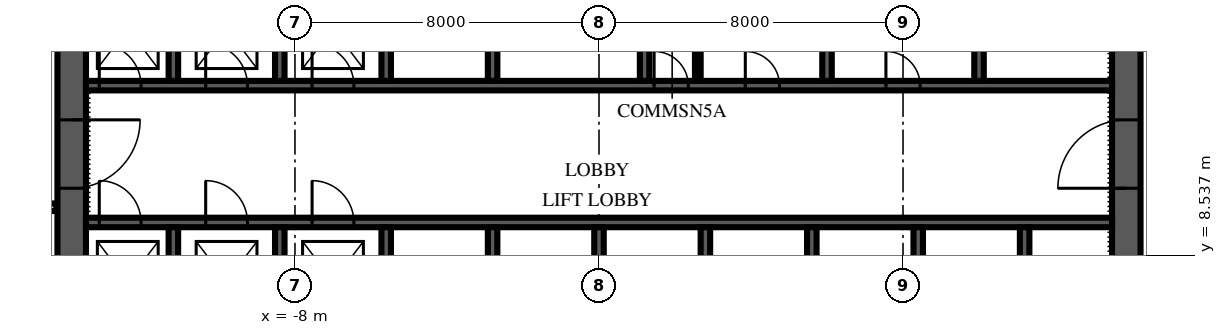
"""IFC4 building model, lengths in metres.
Left out: names, types, materials, properties, quantities, classifications, styles, units other than length and angle.
Written with IfcOpenShell. Run it as: python <this file> out.ifc"""

import sys

from ifc_helpers import new_model, si_unit, direction, frame, frame_2d, origin, place, context, subcontext, project, spatial, polyline, rectangle, outline, extrude, element, fill, save


model = new_model("IFC4")
c1 = context("Model", 3, precision=1e-05, world=origin(), true_north=direction((0.0, 1.0)))
c2 = subcontext(c1, "Body", "Model", "MODEL_VIEW")
j1 = project(units=[si_unit("LENGTHUNIT", "METRE"), si_unit("PLANEANGLEUNIT", "RADIAN")], contexts=[c1])
p1 = place(None, origin())
s1 = spatial("IfcSite", under=j1, at=p1, CompositionType="ELEMENT")
p2 = place(p1, origin())
s2 = spatial("IfcBuilding", under=s1, at=p2, CompositionType="ELEMENT")
p3 = place(p2, frame((0.0, 0.0, 127.0)))
s3 = spatial("IfcBuildingStorey", under=s2, at=p3, CompositionType="ELEMENT", Elevation=127.0)
p4 = place(p3, frame((13.875, 6.125, 0.0), z_axis=(0.0, 0.0, 1.0), x_axis=(0.0, 1.0, 0.0)))
e1 = element("IfcWall", 1, at=p4, inside=s3, PredefinedType="SHEAR", context=c2, shape_type="SweptSolid", body=[
    extrude(outline(polyline([(0.0, -0.375), (17.75, -0.375), (17.75, 0.0), (17.375, 0.0), (17.375, 0.375), (0.375, 0.375), (0.375, 0.0), (0.0, 0.0), (0.0, -0.375)])), origin(), (0.0, 0.0, 1.0), 4.0),
])
p5 = place(p4, frame((4.175, 0.0, 0.0)))
e2 = element("IfcOpeningElement", 2, at=p5, cuts=e1, PredefinedType="OPENING", context=c2, shape_type="SweptSolid", body=[
    extrude(rectangle(XDim=1.8, YDim=2.4, at=frame_2d((0.9, 1.2))), frame((0.0, 0.39, 0.0), z_axis=(0.0, -1.0, 0.0), x_axis=(1.0, 0.0, 0.0)), (0.0, 0.0, 1.0), 0.78),
])
p6 = place(p3, frame((-13.875, 23.875, 0.0), z_axis=(0.0, 0.0, 1.0), x_axis=(0.0, -1.0, 0.0)))
e3 = element("IfcWall", 3, at=p6, inside=s3, PredefinedType="SHEAR", context=c2, shape_type="SweptSolid", body=[
    extrude(outline(polyline([(0.0, -0.375), (17.75, -0.375), (17.75, 0.0), (17.375, 0.0), (17.375, 0.375), (0.375, 0.375), (0.375, 0.0), (0.0, 0.0), (0.0, -0.375)])), origin(), (0.0, 0.0, 1.0), 4.0),
])
p7 = place(p6, frame((11.775, 0.0, 0.0)))
e4 = element("IfcOpeningElement", 4, at=p7, cuts=e3, PredefinedType="OPENING", context=c2, shape_type="SweptSolid", body=[
    extrude(rectangle(XDim=1.8, YDim=2.4, at=frame_2d((0.9, 1.2))), frame((0.0, 0.39, 0.0), z_axis=(0.0, -1.0, 0.0), x_axis=(1.0, 0.0, 0.0)), (0.0, 0.0, 1.0), 0.78),
])
p8 = place(p3, frame((-13.5, 9.4, 0.0), z_axis=(0.0, 0.0, 1.0), x_axis=(1.0, 0.0, 0.0)))
e5 = element("IfcWall", 5, at=p8, inside=s3, PredefinedType="SHEAR", context=c2, shape_type="SweptSolid", body=[
    extrude(rectangle(XDim=27.0, YDim=0.25, at=frame_2d((13.5, 0.0))), origin(), (0.0, 0.0, 1.0), 4.0),
])
p9 = place(p8, frame((0.35, 0.0, 0.0)))
e6 = element("IfcOpeningElement", 6, at=p9, cuts=e5, PredefinedType="OPENING", context=c2, shape_type="SweptSolid", body=[
    extrude(rectangle(XDim=1.1, YDim=2.1, at=frame_2d((0.55, 1.05))), frame((0.0, 0.14, 0.0), z_axis=(0.0, -1.0, 0.0), x_axis=(1.0, 0.0, 0.0)), (0.0, 0.0, 1.0), 0.28),
])
p10 = place(p8, frame((3.15, 0.0, 0.0)))
e7 = element("IfcOpeningElement", 7, at=p10, cuts=e5, PredefinedType="OPENING", context=c2, shape_type="SweptSolid", body=[
    extrude(rectangle(XDim=1.1, YDim=2.1, at=frame_2d((0.55, 1.05))), frame((0.0, 0.14, 0.0), z_axis=(0.0, -1.0, 0.0), x_axis=(1.0, 0.0, 0.0)), (0.0, 0.0, 1.0), 0.28),
])
p11 = place(p8, frame((5.95, 0.0, 0.0)))
e8 = element("IfcOpeningElement", 8, at=p11, cuts=e5, PredefinedType="OPENING", context=c2, shape_type="SweptSolid", body=[
    extrude(rectangle(XDim=1.1, YDim=2.1, at=frame_2d((0.55, 1.05))), frame((0.0, 0.14, 0.0), z_axis=(0.0, -1.0, 0.0), x_axis=(1.0, 0.0, 0.0)), (0.0, 0.0, 1.0), 0.28),
])
p12 = place(p3, frame((-13.5, 13.0, 0.0), z_axis=(0.0, 0.0, 1.0), x_axis=(1.0, 0.0, 0.0)))
e9 = element("IfcWall", 9, at=p12, inside=s3, PredefinedType="SHEAR", context=c2, shape_type="SweptSolid", body=[
    extrude(rectangle(XDim=27.0, YDim=0.25, at=frame_2d((13.5, 0.0))), origin(), (0.0, 0.0, 1.0), 4.0),
])
p13 = place(p12, frame((0.35, 0.0, 0.0)))
e10 = element("IfcOpeningElement", 10, at=p13, cuts=e9, PredefinedType="OPENING", context=c2, shape_type="SweptSolid", body=[
    extrude(rectangle(XDim=1.1, YDim=2.1, at=frame_2d((0.55, 1.05))), frame((0.0, 0.14, 0.0), z_axis=(0.0, -1.0, 0.0), x_axis=(1.0, 0.0, 0.0)), (0.0, 0.0, 1.0), 0.28),
])
p14 = place(p12, frame((3.15, 0.0, 0.0)))
e11 = element("IfcOpeningElement", 11, at=p14, cuts=e9, PredefinedType="OPENING", context=c2, shape_type="SweptSolid", body=[
    extrude(rectangle(XDim=1.1, YDim=2.1, at=frame_2d((0.55, 1.05))), frame((0.0, 0.14, 0.0), z_axis=(0.0, -1.0, 0.0), x_axis=(1.0, 0.0, 0.0)), (0.0, 0.0, 1.0), 0.28),
])
p15 = place(p12, frame((5.95, 0.0, 0.0)))
e12 = element("IfcOpeningElement", 12, at=p15, cuts=e9, PredefinedType="OPENING", context=c2, shape_type="SweptSolid", body=[
    extrude(rectangle(XDim=1.1, YDim=2.1, at=frame_2d((0.55, 1.05))), frame((0.0, 0.14, 0.0), z_axis=(0.0, -1.0, 0.0), x_axis=(1.0, 0.0, 0.0)), (0.0, 0.0, 1.0), 0.28),
])
p16 = place(p12, frame((14.95, 0.0, 0.0)))
e13 = element("IfcOpeningElement", 13, at=p16, cuts=e9, PredefinedType="OPENING", context=c2, shape_type="SweptSolid", body=[
    extrude(rectangle(XDim=0.9, YDim=2.1, at=frame_2d((0.45, 1.05))), frame((0.0, 0.14, 0.0), z_axis=(0.0, -1.0, 0.0), x_axis=(1.0, 0.0, 0.0)), (0.0, 0.0, 1.0), 0.28),
])
p17 = place(p12, frame((17.35, 0.0, 0.0)))
e14 = element("IfcOpeningElement", 14, at=p17, cuts=e9, PredefinedType="OPENING", context=c2, shape_type="SweptSolid", body=[
    extrude(rectangle(XDim=0.9, YDim=2.1, at=frame_2d((0.45, 1.05))), frame((0.0, 0.14, 0.0), z_axis=(0.0, -1.0, 0.0), x_axis=(1.0, 0.0, 0.0)), (0.0, 0.0, 1.0), 0.28),
])
p18 = place(p12, frame((21.05, 0.0, 0.0)))
e15 = element("IfcOpeningElement", 15, at=p18, cuts=e9, PredefinedType="OPENING", context=c2, shape_type="SweptSolid", body=[
    extrude(rectangle(XDim=0.9, YDim=2.1, at=frame_2d((0.45, 1.05))), frame((0.0, 0.14, 0.0), z_axis=(0.0, -1.0, 0.0), x_axis=(1.0, 0.0, 0.0)), (0.0, 0.0, 1.0), 0.28),
])
for number, where, z_axis, x_axis in (
    (16, (-11.2, 6.5, 0.0), (0.0, 0.0, 1.0), (0.0, 1.0, 0.0)),
    (17, (-8.4, 6.5, 0.0), (0.0, 0.0, 1.0), (0.0, 1.0, 0.0)),
    (18, (-5.6, 6.5, 0.0), (0.0, 0.0, 1.0), (0.0, 1.0, 0.0)),
    (19, (-2.8, 6.5, 0.0), (0.0, 0.0, 1.0), (0.0, 1.0, 0.0)),
    (20, (0.0, 6.5, 0.0), (0.0, 0.0, 1.0), (0.0, 1.0, 0.0)),
    (21, (2.8, 6.5, 0.0), (0.0, 0.0, 1.0), (0.0, 1.0, 0.0)),
    (22, (5.6, 6.5, 0.0), (0.0, 0.0, 1.0), (0.0, 1.0, 0.0)),
    (23, (8.4, 6.5, 0.0), (0.0, 0.0, 1.0), (0.0, 1.0, 0.0)),
    (24, (11.2, 6.5, 0.0), (0.0, 0.0, 1.0), (0.0, 1.0, 0.0)),
):
    element("IfcWall", number, at=place(p3, frame(where, z_axis=z_axis, x_axis=x_axis)), inside=s3, PredefinedType="SHEAR", context=c2, shape_type="SweptSolid", body=[
        extrude(rectangle(XDim=2.775, YDim=0.25, at=frame_2d((1.387, 0.0))), origin(), (0.0, 0.0, 1.0), 4.0),
    ])
for number, where, z_axis, x_axis in (
    (25, (-11.2, 13.125, 0.0), (0.0, 0.0, 1.0), (0.0, 1.0, 0.0)),
    (26, (-8.4, 13.125, 0.0), (0.0, 0.0, 1.0), (0.0, 1.0, 0.0)),
    (27, (-5.6, 13.125, 0.0), (0.0, 0.0, 1.0), (0.0, 1.0, 0.0)),
    (28, (-2.8, 13.125, 0.0), (0.0, 0.0, 1.0), (0.0, 1.0, 0.0)),
    (29, (1.2, 13.125, 0.0), (0.0, 0.0, 1.0), (0.0, 1.0, 0.0)),
    (30, (6.0, 13.125, 0.0), (0.0, 0.0, 1.0), (0.0, 1.0, 0.0)),
    (31, (10.0, 13.125, 0.0), (0.0, 0.0, 1.0), (0.0, 1.0, 0.0)),
):
    element("IfcWall", number, at=place(p3, frame(where, z_axis=z_axis, x_axis=x_axis)), inside=s3, PredefinedType="SHEAR", context=c2, shape_type="SweptSolid", body=[
        extrude(rectangle(XDim=2.75, YDim=0.25, at=frame_2d((1.375, 0.0))), origin(), (0.0, 0.0, 1.0), 4.0),
    ])
p19 = place(p3, frame((2.6, 13.125, 0.0), z_axis=(0.0, 0.0, 1.0), x_axis=(0.0, 1.0, 0.0)))
e32 = element("IfcWall", 32, at=p19, inside=s3, PredefinedType="PARTITIONING", context=c2, shape_type="SweptSolid", body=[
    extrude(rectangle(XDim=2.75, YDim=0.15, at=frame_2d((1.375, 0.0))), origin(), (0.0, 0.0, 1.0), 3.85),
])
p20 = place(p3, frame((-16.3, 9.8, 0.0), z_axis=(0.0, 0.0, 1.0), x_axis=(1.0, 0.0, 0.0)))
e33 = element("IfcWall", 33, at=p20, inside=s3, PredefinedType="PARTITIONING", context=c2, shape_type="SweptSolid", body=[
    extrude(rectangle(XDim=2.02, YDim=0.2, at=frame_2d((1.01, 0.0))), origin(), (0.0, 0.0, 1.0), 3.85),
])
p21 = place(p5, origin())
e34 = element("IfcDoor", 34, at=p21, inside=s3, OperationType="DOUBLE_DOOR_SINGLE_SWING", PredefinedType="DOOR", context=c2, shape_type="SweptSolid", body=[
    extrude(rectangle(XDim=1.8, YDim=2.4, at=frame_2d((0.9, 1.2))), frame((0.0, 0.375, 0.0), z_axis=(0.0, -1.0, 0.0), x_axis=(1.0, 0.0, 0.0)), (0.0, 0.0, 1.0), 0.75),
])
fill(e2, e34)
p22 = place(p7, origin())
e35 = element("IfcDoor", 35, at=p22, inside=s3, OperationType="DOUBLE_DOOR_SINGLE_SWING", PredefinedType="DOOR", context=c2, shape_type="SweptSolid", body=[
    extrude(rectangle(XDim=1.8, YDim=2.4, at=frame_2d((0.9, 1.2))), frame((0.0, 0.375, 0.0), z_axis=(0.0, -1.0, 0.0), x_axis=(1.0, 0.0, 0.0)), (0.0, 0.0, 1.0), 0.75),
])
fill(e4, e35)
p23 = place(p9, origin())
e36 = element("IfcDoor", 36, at=p23, inside=s3, OperationType="SLIDING_TO_LEFT", PredefinedType="DOOR", context=c2, shape_type="SweptSolid", body=[
    extrude(rectangle(XDim=1.1, YDim=2.1, at=frame_2d((0.55, 1.05))), frame((0.0, 0.125, 0.0), z_axis=(0.0, -1.0, 0.0), x_axis=(1.0, 0.0, 0.0)), (0.0, 0.0, 1.0), 0.25),
])
fill(e6, e36)
p24 = place(p10, origin())
e37 = element("IfcDoor", 37, at=p24, inside=s3, OperationType="SLIDING_TO_LEFT", PredefinedType="DOOR", context=c2, shape_type="SweptSolid", body=[
    extrude(rectangle(XDim=1.1, YDim=2.1, at=frame_2d((0.55, 1.05))), frame((0.0, 0.125, 0.0), z_axis=(0.0, -1.0, 0.0), x_axis=(1.0, 0.0, 0.0)), (0.0, 0.0, 1.0), 0.25),
])
fill(e7, e37)
p25 = place(p11, origin())
e38 = element("IfcDoor", 38, at=p25, inside=s3, OperationType="SLIDING_TO_LEFT", PredefinedType="DOOR", context=c2, shape_type="SweptSolid", body=[
    extrude(rectangle(XDim=1.1, YDim=2.1, at=frame_2d((0.55, 1.05))), frame((0.0, 0.125, 0.0), z_axis=(0.0, -1.0, 0.0), x_axis=(1.0, 0.0, 0.0)), (0.0, 0.0, 1.0), 0.25),
])
fill(e8, e38)
p26 = place(p13, origin())
e39 = element("IfcDoor", 39, at=p26, inside=s3, OperationType="SLIDING_TO_LEFT", PredefinedType="DOOR", context=c2, shape_type="SweptSolid", body=[
    extrude(rectangle(XDim=1.1, YDim=2.1, at=frame_2d((0.55, 1.05))), frame((0.0, 0.125, 0.0), z_axis=(0.0, -1.0, 0.0), x_axis=(1.0, 0.0, 0.0)), (0.0, 0.0, 1.0), 0.25),
])
fill(e10, e39)
p27 = place(p14, origin())
e40 = element("IfcDoor", 40, at=p27, inside=s3, OperationType="SLIDING_TO_LEFT", PredefinedType="DOOR", context=c2, shape_type="SweptSolid", body=[
    extrude(rectangle(XDim=1.1, YDim=2.1, at=frame_2d((0.55, 1.05))), frame((0.0, 0.125, 0.0), z_axis=(0.0, -1.0, 0.0), x_axis=(1.0, 0.0, 0.0)), (0.0, 0.0, 1.0), 0.25),
])
fill(e11, e40)
p28 = place(p15, origin())
e41 = element("IfcDoor", 41, at=p28, inside=s3, OperationType="SLIDING_TO_LEFT", PredefinedType="DOOR", context=c2, shape_type="SweptSolid", body=[
    extrude(rectangle(XDim=1.1, YDim=2.1, at=frame_2d((0.55, 1.05))), frame((0.0, 0.125, 0.0), z_axis=(0.0, -1.0, 0.0), x_axis=(1.0, 0.0, 0.0)), (0.0, 0.0, 1.0), 0.25),
])
fill(e12, e41)
p29 = place(p16, origin())
e42 = element("IfcDoor", 42, at=p29, inside=s3, OperationType="SINGLE_SWING_LEFT", PredefinedType="DOOR", context=c2, shape_type="SweptSolid", body=[
    extrude(rectangle(XDim=0.9, YDim=2.1, at=frame_2d((0.45, 1.05))), frame((0.0, 0.125, 0.0), z_axis=(0.0, -1.0, 0.0), x_axis=(1.0, 0.0, 0.0)), (0.0, 0.0, 1.0), 0.25),
])
fill(e13, e42)
p30 = place(p17, origin())
e43 = element("IfcDoor", 43, at=p30, inside=s3, OperationType="SINGLE_SWING_LEFT", PredefinedType="DOOR", context=c2, shape_type="SweptSolid", body=[
    extrude(rectangle(XDim=0.9, YDim=2.1, at=frame_2d((0.45, 1.05))), frame((0.0, 0.125, 0.0), z_axis=(0.0, -1.0, 0.0), x_axis=(1.0, 0.0, 0.0)), (0.0, 0.0, 1.0), 0.25),
])
fill(e14, e43)
p31 = place(p18, origin())
e44 = element("IfcDoor", 44, at=p31, inside=s3, OperationType="SINGLE_SWING_LEFT", PredefinedType="DOOR", context=c2, shape_type="SweptSolid", body=[
    extrude(rectangle(XDim=0.9, YDim=2.1, at=frame_2d((0.45, 1.05))), frame((0.0, 0.125, 0.0), z_axis=(0.0, -1.0, 0.0), x_axis=(1.0, 0.0, 0.0)), (0.0, 0.0, 1.0), 0.25),
])
fill(e15, e44)
save(model, sys.argv[1])
